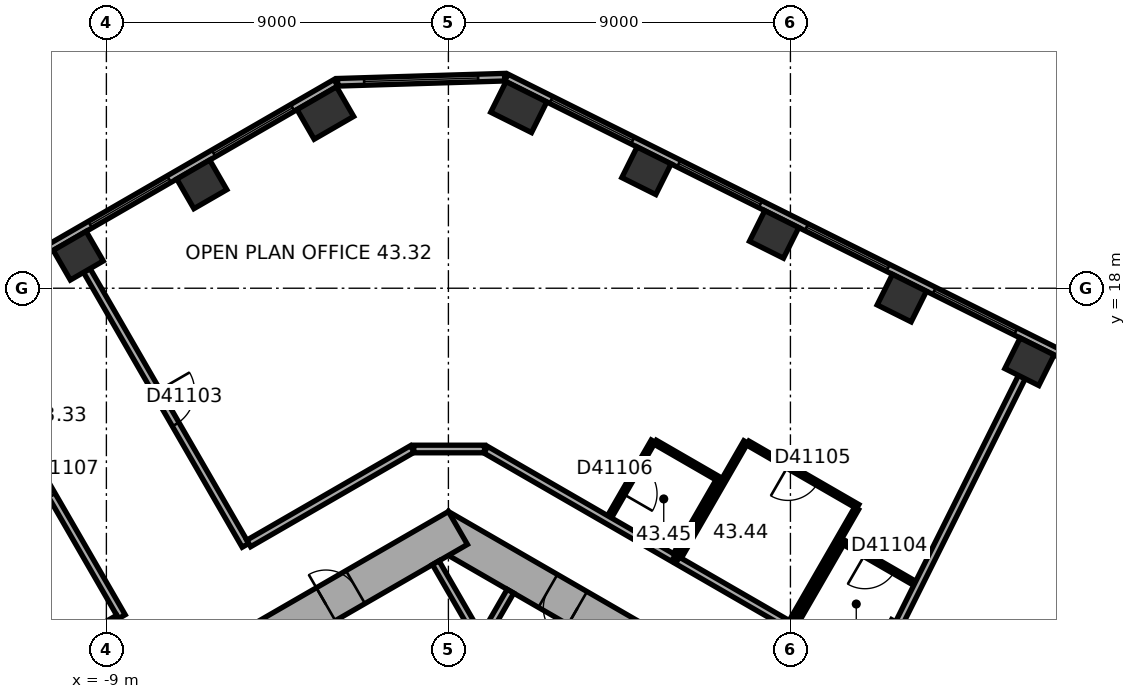
"""IFC4 building model, lengths in metres.
Left out: names, types, materials, properties, quantities, classifications, styles, units other than length and angle.
Written with IfcOpenShell. Run it as: python <this file> out.ifc"""

import sys

from ifc_helpers import new_model, si_unit, direction, frame, frame_2d, origin, origin_2d, place, context, subcontext, project, spatial, rectangle, extrude, element, fill, save


model = new_model("IFC4")
c1 = context("Model", 3, precision=1e-05, world=origin(), true_north=direction((0.0, 1.0)))
c2 = subcontext(c1, "Body", "Model", "MODEL_VIEW")
j1 = project(units=[si_unit("LENGTHUNIT", "METRE"), si_unit("PLANEANGLEUNIT", "RADIAN")], contexts=[c1])
p1 = place(None, origin())
s1 = spatial("IfcSite", under=j1, at=p1, CompositionType="ELEMENT")
p2 = place(p1, origin())
s2 = spatial("IfcBuilding", under=s1, at=p2, CompositionType="ELEMENT")
p3 = place(p2, frame((0.0, 0.0, 176.2)))
s3 = spatial("IfcBuildingStorey", under=s2, at=p3, CompositionType="ELEMENT", Elevation=176.2)
for number, where, z_axis, x_axis in (
    (1, (15.29, 16.065, 0.0), (0.0, 0.0, 1.0), (-0.895, 0.446, 0.0)),
    (2, (11.931, 17.74, 0.0), (0.0, 0.0, 1.0), (-0.895, 0.446, 0.0)),
    (3, (8.571, 19.416, 0.0), (0.0, 0.0, 1.0), (-0.895, 0.446, 0.0)),
    (4, (5.211, 21.091, 0.0), (0.0, 0.0, 1.0), (-0.895, 0.446, 0.0)),
):
    element("IfcColumn", number, at=place(p3, frame(where, z_axis=z_axis, x_axis=x_axis)), inside=s3, PredefinedType="COLUMN", context=c2, shape_type="SweptSolid", body=[
        extrude(rectangle(XDim=1.0, YDim=0.9, at=origin_2d()), origin(), (0.0, 0.0, 1.0), 3.7),
    ])
for number, where, z_axis, x_axis in (
    (5, (1.852, 22.766, 0.0), (0.0, 0.0, 1.0), (-0.895, 0.446, 0.0)),
    (6, (-3.238, 22.61, 0.0), (0.0, 0.0, 1.0), (-0.866, -0.5, 0.0)),
):
    element("IfcColumn", number, at=place(p3, frame(where, z_axis=z_axis, x_axis=x_axis)), inside=s3, PredefinedType="COLUMN", context=c2, shape_type="SweptSolid", body=[
        extrude(rectangle(XDim=1.2, YDim=0.9, at=origin_2d()), origin(), (0.0, 0.0, 1.0), 3.7),
    ])
for number, where, z_axis, x_axis in (
    (7, (-6.489, 20.733, 0.0), (0.0, 0.0, 1.0), (-0.866, -0.5, 0.0)),
    (8, (-9.74, 18.856, 0.0), (0.0, 0.0, 1.0), (-0.866, -0.5, 0.0)),
):
    element("IfcColumn", number, at=place(p3, frame(where, z_axis=z_axis, x_axis=x_axis)), inside=s3, PredefinedType="COLUMN", context=c2, shape_type="SweptSolid", body=[
        extrude(rectangle(XDim=1.0, YDim=0.9, at=origin_2d()), origin(), (0.0, 0.0, 1.0), 3.7),
    ])
p4 = place(p3, frame((10.25, 5.629, 0.0), z_axis=(0.0, 0.0, 1.0), x_axis=(-0.866022616891, 0.50000482701, 0.0)))
e9 = element("IfcWall", 9, at=p4, inside=s3, PredefinedType="SHEAR", context=c2, shape_type="SweptSolid", body=[
    extrude(rectangle(XDim=12.125, YDim=1.0, at=frame_2d((6.062, 0.0))), origin(), (0.0, 0.0, 1.0), 3.7),
])
p5 = place(p4, frame((4.012, 0.0, 0.0)))
e10 = element("IfcOpeningElement", 10, at=p5, cuts=e9, PredefinedType="OPENING", context=c2, shape_type="SweptSolid", body=[
    extrude(rectangle(XDim=0.9, YDim=2.1, at=frame_2d((0.45, 1.05))), frame((0.0, 0.51, 0.0), z_axis=(0.0, -1.0, 0.0), x_axis=(1.0, 0.0, 0.0)), (0.0, 0.0, 1.0), 1.02),
])
p6 = place(p4, frame((7.912, 0.0, 0.0)))
e11 = element("IfcOpeningElement", 11, at=p6, cuts=e9, PredefinedType="OPENING", context=c2, shape_type="SweptSolid", body=[
    extrude(rectangle(XDim=0.9, YDim=2.1, at=frame_2d((0.45, 1.05))), frame((0.0, 0.51, 0.0), z_axis=(0.0, -1.0, 0.0), x_axis=(1.0, 0.0, 0.0)), (0.0, 0.0, 1.0), 1.02),
])
p7 = place(p3, frame((0.25, 11.691, 0.0), z_axis=(0.0, 0.0, 1.0), x_axis=(-0.866022616891, -0.50000482701, 0.0)))
e12 = element("IfcWall", 12, at=p7, inside=s3, PredefinedType="SHEAR", context=c2, shape_type="SweptSolid", body=[
    extrude(rectangle(XDim=12.125, YDim=1.0, at=frame_2d((6.062, 0.0))), origin(), (0.0, 0.0, 1.0), 3.7),
])
p8 = place(p7, frame((6.262, 0.0, 0.0)))
e13 = element("IfcOpeningElement", 13, at=p8, cuts=e12, PredefinedType="OPENING", context=c2, shape_type="SweptSolid", body=[
    extrude(rectangle(XDim=1.5, YDim=2.1, at=frame_2d((0.75, 1.05))), frame((0.0, 0.51, 0.0), z_axis=(0.0, -1.0, 0.0), x_axis=(1.0, 0.0, 0.0)), (0.0, 0.0, 1.0), 1.02),
])
p9 = place(p7, frame((3.112, 0.0, 0.0)))
e14 = element("IfcOpeningElement", 14, at=p9, cuts=e12, PredefinedType="OPENING", context=c2, shape_type="SweptSolid", body=[
    extrude(rectangle(XDim=0.9, YDim=2.1, at=frame_2d((0.45, 1.05))), frame((0.0, 0.51, 0.0), z_axis=(0.0, -1.0, 0.0), x_axis=(1.0, 0.0, 0.0)), (0.0, 0.0, 1.0), 1.02),
])
p10 = place(p3, frame((19.464, 14.599, 0.0), z_axis=(0.0, 0.0, 1.0), x_axis=(-0.894935755043, 0.446195018289, 0.0)))
e15 = element("IfcWall", 15, at=p10, inside=s3, PredefinedType="STANDARD", context=c2, shape_type="SweptSolid", body=[
    extrude(rectangle(XDim=20.044, YDim=0.2, at=frame_2d((10.022, 0.0))), origin(), (0.0, 0.0, 1.0), 3.7),
])
p11 = place(p10, frame((1.313, 0.0, 0.9)))
e16 = element("IfcOpeningElement", 16, at=p11, cuts=e15, PredefinedType="OPENING", context=c2, shape_type="SweptSolid", body=[
    extrude(rectangle(XDim=2.4, YDim=2.0, at=frame_2d((1.2, 1.0))), frame((0.0, 0.11, 0.0), z_axis=(0.0, -1.0, 0.0), x_axis=(1.0, 0.0, 0.0)), (0.0, 0.0, 1.0), 0.22),
])
p12 = place(p10, frame((5.067, 0.0, 0.9)))
e17 = element("IfcOpeningElement", 17, at=p12, cuts=e15, PredefinedType="OPENING", context=c2, shape_type="SweptSolid", body=[
    extrude(rectangle(XDim=2.4, YDim=2.0, at=frame_2d((1.2, 1.0))), frame((0.0, 0.11, 0.0), z_axis=(0.0, -1.0, 0.0), x_axis=(1.0, 0.0, 0.0)), (0.0, 0.0, 1.0), 0.22),
])
p13 = place(p10, frame((8.821, 0.0, 0.9)))
e18 = element("IfcOpeningElement", 18, at=p13, cuts=e15, PredefinedType="OPENING", context=c2, shape_type="SweptSolid", body=[
    extrude(rectangle(XDim=2.4, YDim=2.0, at=frame_2d((1.2, 1.0))), frame((0.0, 0.11, 0.0), z_axis=(0.0, -1.0, 0.0), x_axis=(1.0, 0.0, 0.0)), (0.0, 0.0, 1.0), 0.22),
])
p14 = place(p10, frame((12.575, 0.0, 0.9)))
e19 = element("IfcOpeningElement", 19, at=p14, cuts=e15, PredefinedType="OPENING", context=c2, shape_type="SweptSolid", body=[
    extrude(rectangle(XDim=2.4, YDim=2.0, at=frame_2d((1.2, 1.0))), frame((0.0, 0.11, 0.0), z_axis=(0.0, -1.0, 0.0), x_axis=(1.0, 0.0, 0.0)), (0.0, 0.0, 1.0), 0.22),
])
p15 = place(p10, frame((16.329, 0.0, 0.9)))
e20 = element("IfcOpeningElement", 20, at=p15, cuts=e15, PredefinedType="OPENING", context=c2, shape_type="SweptSolid", body=[
    extrude(rectangle(XDim=2.4, YDim=2.0, at=frame_2d((1.2, 1.0))), frame((0.0, 0.11, 0.0), z_axis=(0.0, -1.0, 0.0), x_axis=(1.0, 0.0, 0.0)), (0.0, 0.0, 1.0), 0.22),
])
p16 = place(p3, frame((1.479, 23.553, 0.0), z_axis=(0.0, 0.0, 1.0), x_axis=(-0.999534786117, -0.03049936625, 0.0)))
e21 = element("IfcWall", 21, at=p16, inside=s3, PredefinedType="STANDARD", context=c2, shape_type="SweptSolid", body=[
    extrude(rectangle(XDim=4.395, YDim=0.2, at=frame_2d((2.197, 0.0))), origin(), (0.0, 0.0, 1.0), 3.7),
])
p17 = place(p16, frame((0.698, 0.0, 0.9)))
e22 = element("IfcOpeningElement", 22, at=p17, cuts=e21, PredefinedType="OPENING", context=c2, shape_type="SweptSolid", body=[
    extrude(rectangle(XDim=3.0, YDim=2.0, at=frame_2d((1.5, 1.0))), frame((0.0, 0.11, 0.0), z_axis=(0.0, -1.0, 0.0), x_axis=(1.0, 0.0, 0.0)), (0.0, 0.0, 1.0), 0.22),
])
p18 = place(p3, frame((-2.961, 23.405, 0.0), z_axis=(0.0, 0.0, 1.0), x_axis=(-0.866023315909, -0.500003616288, 0.0)))
e23 = element("IfcWall", 23, at=p18, inside=s3, PredefinedType="STANDARD", context=c2, shape_type="SweptSolid", body=[
    extrude(rectangle(XDim=20.044, YDim=0.2, at=frame_2d((10.022, 0.0))), origin(), (0.0, 0.0, 1.0), 3.7),
])
p19 = place(p18, frame((1.314, 0.0, 0.9)))
e24 = element("IfcOpeningElement", 24, at=p19, cuts=e23, PredefinedType="OPENING", context=c2, shape_type="SweptSolid", body=[
    extrude(rectangle(XDim=2.4, YDim=2.0, at=frame_2d((1.2, 1.0))), frame((0.0, 0.11, 0.0), z_axis=(0.0, -1.0, 0.0), x_axis=(1.0, 0.0, 0.0)), (0.0, 0.0, 1.0), 0.22),
])
p20 = place(p18, frame((5.069, 0.0, 0.9)))
e25 = element("IfcOpeningElement", 25, at=p20, cuts=e23, PredefinedType="OPENING", context=c2, shape_type="SweptSolid", body=[
    extrude(rectangle(XDim=2.4, YDim=2.0, at=frame_2d((1.2, 1.0))), frame((0.0, 0.11, 0.0), z_axis=(0.0, -1.0, 0.0), x_axis=(1.0, 0.0, 0.0)), (0.0, 0.0, 1.0), 0.22),
])
p21 = place(p18, frame((8.823, 0.0, 0.9)))
e26 = element("IfcOpeningElement", 26, at=p21, cuts=e23, PredefinedType="OPENING", context=c2, shape_type="SweptSolid", body=[
    extrude(rectangle(XDim=2.4, YDim=2.0, at=frame_2d((1.2, 1.0))), frame((0.0, 0.11, 0.0), z_axis=(0.0, -1.0, 0.0), x_axis=(1.0, 0.0, 0.0)), (0.0, 0.0, 1.0), 0.22),
])
p22 = place(p18, frame((12.577, 0.0, 0.9)))
e27 = element("IfcOpeningElement", 27, at=p22, cuts=e23, PredefinedType="OPENING", context=c2, shape_type="SweptSolid", body=[
    extrude(rectangle(XDim=2.4, YDim=2.0, at=frame_2d((1.2, 1.0))), frame((0.0, 0.11, 0.0), z_axis=(0.0, -1.0, 0.0), x_axis=(1.0, 0.0, 0.0)), (0.0, 0.0, 1.0), 0.22),
])
p23 = place(p18, frame((16.331, 0.0, 0.9)))
e28 = element("IfcOpeningElement", 28, at=p23, cuts=e23, PredefinedType="OPENING", context=c2, shape_type="SweptSolid", body=[
    extrude(rectangle(XDim=2.4, YDim=2.0, at=frame_2d((1.2, 1.0))), frame((0.0, 0.11, 0.0), z_axis=(0.0, -1.0, 0.0), x_axis=(1.0, 0.0, 0.0)), (0.0, 0.0, 1.0), 0.22),
])
p24 = place(p3, frame((0.532, 8.122, 0.0), z_axis=(0.0, 0.0, 1.0), x_axis=(0.500077893725, 0.86598042715, 0.0)))
e29 = element("IfcWall", 29, at=p24, inside=s3, PredefinedType="PARTITIONING", context=c2, shape_type="SweptSolid", body=[
    extrude(rectangle(XDim=2.2, YDim=0.2, at=frame_2d((1.1, 0.0))), origin(), (0.0, 0.0, 1.0), 3.42),
])
p25 = place(p3, frame((0.767, 8.872, 0.0), z_axis=(0.0, 0.0, 1.0), x_axis=(-0.499994660107, 0.866028486751, 0.0)))
e30 = element("IfcWall", 30, at=p25, inside=s3, PredefinedType="PARTITIONING", context=c2, shape_type="SweptSolid", body=[
    extrude(rectangle(XDim=2.2, YDim=0.2, at=frame_2d((1.1, 0.0))), origin(), (0.0, 0.0, 1.0), 3.42),
])
p26 = place(p3, frame((-12.766, 16.589, 0.0), z_axis=(0.0, 0.0, 1.0), x_axis=(0.500010139422, -0.866019549707, 0.0)))
e31 = element("IfcWall", 31, at=p26, inside=s3, PredefinedType="PARTITIONING", context=c2, shape_type="SweptSolid", body=[
    extrude(rectangle(XDim=8.35, YDim=0.2, at=frame_2d((4.175, 0.0))), origin(), (0.0, 0.0, 1.0), 3.42),
])
p27 = place(p26, frame((3.675, 0.0, 0.0)))
e32 = element("IfcOpeningElement", 32, at=p27, cuts=e31, PredefinedType="OPENING", context=c2, shape_type="SweptSolid", body=[
    extrude(rectangle(XDim=1.0, YDim=2.1, at=frame_2d((0.5, 1.05))), frame((0.0, 0.11, 0.0), z_axis=(0.0, -1.0, 0.0), x_axis=(1.0, 0.0, 0.0)), (0.0, 0.0, 1.0), 0.22),
])
p28 = place(p3, frame((-9.515, 18.466, 0.0), z_axis=(0.0, 0.0, 1.0), x_axis=(0.500010139422, -0.866019549707, 0.0)))
e33 = element("IfcWall", 33, at=p28, inside=s3, PredefinedType="PARTITIONING", context=c2, shape_type="SweptSolid", body=[
    extrude(rectangle(XDim=8.35, YDim=0.2, at=frame_2d((4.175, 0.0))), origin(), (0.0, 0.0, 1.0), 2.87),
])
p29 = place(p28, frame((3.675, 0.0, 0.0)))
e34 = element("IfcOpeningElement", 34, at=p29, cuts=e33, PredefinedType="OPENING", context=c2, shape_type="SweptSolid", body=[
    extrude(rectangle(XDim=1.0, YDim=2.1, at=frame_2d((0.5, 1.05))), frame((0.0, 0.11, 0.0), z_axis=(0.0, -1.0, 0.0), x_axis=(1.0, 0.0, 0.0)), (0.0, 0.0, 1.0), 0.22),
])
p30 = place(p3, frame((-8.678, 9.308, 0.0), z_axis=(0.0, 0.0, 1.0), x_axis=(-0.866000359435, -0.500043375578, 0.0)))
e35 = element("IfcWall", 35, at=p30, inside=s3, PredefinedType="PARTITIONING", context=c2, shape_type="SweptSolid", body=[
    extrude(rectangle(XDim=3.161, YDim=0.2, at=frame_2d((1.581, 0.0))), origin(), (0.0, 0.0, 1.0), 3.42),
])
p31 = place(p3, frame((-0.95, 13.77, 0.0), z_axis=(0.0, 0.0, 1.0), x_axis=(-0.866036689987, -0.499980451214, 0.0)))
e36 = element("IfcWall", 36, at=p31, inside=s3, PredefinedType="PARTITIONING", context=c2, shape_type="SweptSolid", body=[
    extrude(rectangle(XDim=4.969, YDim=0.2, at=frame_2d((2.485, 0.0))), origin(), (0.0, 0.0, 1.0), 3.42),
])
p32 = place(p3, frame((0.95, 13.77, 0.0), z_axis=(0.0, 0.0, 1.0), x_axis=(-1.0, 0.0, 0.0)))
e37 = element("IfcWall", 37, at=p32, inside=s3, PredefinedType="PARTITIONING", context=c2, shape_type="SweptSolid", body=[
    extrude(rectangle(XDim=1.86, YDim=0.2, at=frame_2d((0.93, 0.0))), origin(), (0.0, 0.0, 1.0), 3.42),
])
p33 = place(p3, frame((4.24, 11.986, 0.0), z_axis=(0.0, 0.0, 1.0), x_axis=(0.499952165731, 0.866053019151, 0.0)))
e38 = element("IfcWall", 38, at=p33, inside=s3, PredefinedType="PARTITIONING", context=c2, shape_type="SweptSolid", body=[
    extrude(rectangle(XDim=2.3, YDim=0.12, at=frame_2d((1.15, 0.0))), origin(), (0.0, 0.0, 1.0), 3.42),
])
p34 = place(p33, frame((0.7, 0.0, 0.0)))
e39 = element("IfcOpeningElement", 39, at=p34, cuts=e38, PredefinedType="OPENING", context=c2, shape_type="SweptSolid", body=[
    extrude(rectangle(XDim=0.9, YDim=2.1, at=frame_2d((0.45, 1.05))), frame((0.0, 0.07, 0.0), z_axis=(0.0, -1.0, 0.0), x_axis=(1.0, 0.0, 0.0)), (0.0, 0.0, 1.0), 0.14),
])
p35 = place(p3, frame((5.442, 13.948, 0.0), z_axis=(0.0, 0.0, 1.0), x_axis=(0.866043088465, -0.499969367985, 0.0)))
e40 = element("IfcWall", 40, at=p35, inside=s3, PredefinedType="PARTITIONING", context=c2, shape_type="SweptSolid", body=[
    extrude(rectangle(XDim=1.94, YDim=0.12, at=frame_2d((0.97, 0.0))), origin(), (0.0, 0.0, 1.0), 3.42),
])
p36 = place(p3, frame((5.922, 10.899, 0.0), z_axis=(0.0, 0.0, 1.0), x_axis=(-0.866031556924, 0.499989342298, 0.0)))
e41 = element("IfcWall", 41, at=p36, inside=s3, PredefinedType="PARTITIONING", context=c2, shape_type="SweptSolid", body=[
    extrude(rectangle(XDim=5.701, YDim=0.2, at=frame_2d((2.851, 0.0))), origin(), (0.0, 0.0, 1.0), 3.42),
])
p37 = place(p3, frame((6.076, 10.926, 0.0), z_axis=(0.0, 0.0, 1.0), x_axis=(0.500010275428, 0.866019471182, 0.0)))
e42 = element("IfcWall", 42, at=p37, inside=s3, PredefinedType="PARTITIONING", context=c2, shape_type="SweptSolid", body=[
    extrude(rectangle(XDim=3.5, YDim=0.12, at=frame_2d((1.75, 0.0))), origin(), (0.0, 0.0, 1.0), 3.42),
])
p38 = place(p3, frame((7.092, 12.926, 0.0), z_axis=(0.0, 0.0, 1.0), x_axis=(-0.500030632641, -0.866007717299, 0.0)))
e43 = element("IfcWall", 43, at=p38, inside=s3, PredefinedType="PARTITIONING", context=c2, shape_type="SweptSolid", body=[
    extrude(rectangle(XDim=2.24, YDim=0.12, at=frame_2d((1.12, 0.0))), origin(), (0.0, 0.0, 1.0), 3.42),
])
p39 = place(p3, frame((7.878, 13.927, 0.0), z_axis=(0.0, 0.0, 1.0), x_axis=(0.866021245731, -0.500007201891, 0.0)))
e44 = element("IfcWall", 44, at=p39, inside=s3, PredefinedType="PARTITIONING", context=c2, shape_type="SweptSolid", body=[
    extrude(rectangle(XDim=3.34, YDim=0.12, at=frame_2d((1.67, 0.0))), origin(), (0.0, 0.0, 1.0), 3.42),
])
p40 = place(p39, frame((1.22, 0.0, 0.0)))
e45 = element("IfcOpeningElement", 45, at=p40, cuts=e44, PredefinedType="OPENING", context=c2, shape_type="SweptSolid", body=[
    extrude(rectangle(XDim=0.9, YDim=2.1, at=frame_2d((0.45, 1.05))), frame((0.0, 0.07, 0.0), z_axis=(0.0, -1.0, 0.0), x_axis=(1.0, 0.0, 0.0)), (0.0, 0.0, 1.0), 0.14),
])
p41 = place(p3, frame((8.971, 9.139, 0.0), z_axis=(0.0, 0.0, 1.0), x_axis=(-0.866038511948, 0.499977295307, 0.0)))
e46 = element("IfcWall", 46, at=p41, inside=s3, PredefinedType="PARTITIONING", context=c2, shape_type="SweptSolid", body=[
    extrude(rectangle(XDim=3.4, YDim=0.2, at=frame_2d((1.7, 0.0))), origin(), (0.0, 0.0, 1.0), 3.42),
])
p42 = place(p3, frame((9.125, 9.166, 0.0), z_axis=(0.0, 0.0, 1.0), x_axis=(0.500004234368, 0.866022959057, 0.0)))
e47 = element("IfcWall", 47, at=p42, inside=s3, PredefinedType="PARTITIONING", context=c2, shape_type="SweptSolid", body=[
    extrude(rectangle(XDim=2.5, YDim=0.12, at=frame_2d((1.25, 0.0))), origin(), (0.0, 0.0, 1.0), 3.42),
])
p43 = place(p3, frame((10.427, 11.301, 0.0), z_axis=(0.0, 0.0, 1.0), x_axis=(0.866019511163, -0.500010206181, 0.0)))
e48 = element("IfcWall", 48, at=p43, inside=s3, PredefinedType="PARTITIONING", context=c2, shape_type="SweptSolid", body=[
    extrude(rectangle(XDim=2.13, YDim=0.12, at=frame_2d((1.065, 0.0))), origin(), (0.0, 0.0, 1.0), 3.42),
])
p44 = place(p43, frame((0.615, 0.0, 0.0)))
e49 = element("IfcOpeningElement", 49, at=p44, cuts=e48, PredefinedType="OPENING", context=c2, shape_type="SweptSolid", body=[
    extrude(rectangle(XDim=0.9, YDim=2.1, at=frame_2d((0.45, 1.05))), frame((0.0, 0.07, 0.0), z_axis=(0.0, -1.0, 0.0), x_axis=(1.0, 0.0, 0.0)), (0.0, 0.0, 1.0), 0.14),
])
p45 = place(p3, frame((10.74, 12.205, 0.0), z_axis=(0.0, 0.0, 1.0), x_axis=(-0.499978425106, -0.866037859697, 0.0)))
e50 = element("IfcWall", 50, at=p45, inside=s3, PredefinedType="PARTITIONING", context=c2, shape_type="SweptSolid", body=[
    extrude(rectangle(XDim=3.44, YDim=0.12, at=frame_2d((1.72, 0.0))), origin(), (0.0, 0.0, 1.0), 3.42),
])
p46 = place(p3, frame((15.09, 15.663, 0.0), z_axis=(0.0, 0.0, 1.0), x_axis=(-0.446206011687, -0.894930273895, 0.0)))
e51 = element("IfcWall", 51, at=p46, inside=s3, PredefinedType="PARTITIONING", context=c2, shape_type="SweptSolid", body=[
    extrude(rectangle(XDim=8.725, YDim=0.2, at=frame_2d((4.363, 0.0))), origin(), (0.0, 0.0, 1.0), 3.42),
])
p47 = place(p12, origin())
e52 = element("IfcWindow", 52, at=p47, inside=s3, PartitioningType="SINGLE_PANEL", PredefinedType="WINDOW", context=c2, shape_type="SweptSolid", body=[
    extrude(rectangle(XDim=2.4, YDim=2.0, at=frame_2d((1.2, 1.0))), frame((0.0, 0.03, 0.0), z_axis=(0.0, -1.0, 0.0), x_axis=(1.0, 0.0, 0.0)), (0.0, 0.0, 1.0), 0.06),
])
fill(e17, e52)
p48 = place(p13, origin())
e53 = element("IfcWindow", 53, at=p48, inside=s3, PartitioningType="SINGLE_PANEL", PredefinedType="WINDOW", context=c2, shape_type="SweptSolid", body=[
    extrude(rectangle(XDim=2.4, YDim=2.0, at=frame_2d((1.2, 1.0))), frame((0.0, 0.03, 0.0), z_axis=(0.0, -1.0, 0.0), x_axis=(1.0, 0.0, 0.0)), (0.0, 0.0, 1.0), 0.06),
])
fill(e18, e53)
p49 = place(p14, origin())
e54 = element("IfcWindow", 54, at=p49, inside=s3, PartitioningType="SINGLE_PANEL", PredefinedType="WINDOW", context=c2, shape_type="SweptSolid", body=[
    extrude(rectangle(XDim=2.4, YDim=2.0, at=frame_2d((1.2, 1.0))), frame((0.0, 0.03, 0.0), z_axis=(0.0, -1.0, 0.0), x_axis=(1.0, 0.0, 0.0)), (0.0, 0.0, 1.0), 0.06),
])
fill(e19, e54)
p50 = place(p15, origin())
e55 = element("IfcWindow", 55, at=p50, inside=s3, PartitioningType="SINGLE_PANEL", PredefinedType="WINDOW", context=c2, shape_type="SweptSolid", body=[
    extrude(rectangle(XDim=2.4, YDim=2.0, at=frame_2d((1.2, 1.0))), frame((0.0, 0.03, 0.0), z_axis=(0.0, -1.0, 0.0), x_axis=(1.0, 0.0, 0.0)), (0.0, 0.0, 1.0), 0.06),
])
fill(e20, e55)
p51 = place(p17, origin())
e56 = element("IfcWindow", 56, at=p51, inside=s3, PartitioningType="SINGLE_PANEL", PredefinedType="WINDOW", context=c2, shape_type="SweptSolid", body=[
    extrude(rectangle(XDim=3.0, YDim=2.0, at=frame_2d((1.5, 1.0))), frame((0.0, 0.03, 0.0), z_axis=(0.0, -1.0, 0.0), x_axis=(1.0, 0.0, 0.0)), (0.0, 0.0, 1.0), 0.06),
])
fill(e22, e56)
p52 = place(p19, origin())
e57 = element("IfcWindow", 57, at=p52, inside=s3, PartitioningType="SINGLE_PANEL", PredefinedType="WINDOW", context=c2, shape_type="SweptSolid", body=[
    extrude(rectangle(XDim=2.4, YDim=2.0, at=frame_2d((1.2, 1.0))), frame((0.0, 0.03, 0.0), z_axis=(0.0, -1.0, 0.0), x_axis=(1.0, 0.0, 0.0)), (0.0, 0.0, 1.0), 0.06),
])
fill(e24, e57)
p53 = place(p20, origin())
e58 = element("IfcWindow", 58, at=p53, inside=s3, PartitioningType="SINGLE_PANEL", PredefinedType="WINDOW", context=c2, shape_type="SweptSolid", body=[
    extrude(rectangle(XDim=2.4, YDim=2.0, at=frame_2d((1.2, 1.0))), frame((0.0, 0.03, 0.0), z_axis=(0.0, -1.0, 0.0), x_axis=(1.0, 0.0, 0.0)), (0.0, 0.0, 1.0), 0.06),
])
fill(e25, e58)
p54 = place(p6, origin())
e59 = element("IfcDoor", 59, at=p54, inside=s3, OperationType="SINGLE_SWING_LEFT", PredefinedType="DOOR", context=c2, shape_type="SweptSolid", body=[
    extrude(rectangle(XDim=0.9, YDim=2.1, at=frame_2d((0.45, 1.05))), frame((0.0, 0.025, 0.0), z_axis=(0.0, -1.0, 0.0), x_axis=(1.0, 0.0, 0.0)), (0.0, 0.0, 1.0), 0.05),
])
fill(e11, e59)
p55 = place(p9, origin())
e60 = element("IfcDoor", 60, at=p55, inside=s3, OperationType="SINGLE_SWING_LEFT", PredefinedType="DOOR", context=c2, shape_type="SweptSolid", body=[
    extrude(rectangle(XDim=0.9, YDim=2.1, at=frame_2d((0.45, 1.05))), frame((0.0, 0.025, 0.0), z_axis=(0.0, -1.0, 0.0), x_axis=(1.0, 0.0, 0.0)), (0.0, 0.0, 1.0), 0.05),
])
fill(e14, e60)
p56 = place(p29, origin())
e61 = element("IfcDoor", 61, at=p56, inside=s3, OperationType="SINGLE_SWING_LEFT", PredefinedType="DOOR", context=c2, shape_type="SweptSolid", body=[
    extrude(rectangle(XDim=1.0, YDim=2.1, at=frame_2d((0.5, 1.05))), frame((0.0, 0.025, 0.0), z_axis=(0.0, -1.0, 0.0), x_axis=(1.0, 0.0, 0.0)), (0.0, 0.0, 1.0), 0.05),
])
fill(e34, e61)
p57 = place(p44, origin())
e62 = element("IfcDoor", 62, at=p57, inside=s3, OperationType="SINGLE_SWING_LEFT", PredefinedType="DOOR", context=c2, shape_type="SweptSolid", body=[
    extrude(rectangle(XDim=0.9, YDim=2.1, at=frame_2d((0.45, 1.05))), frame((0.0, 0.025, 0.0), z_axis=(0.0, -1.0, 0.0), x_axis=(1.0, 0.0, 0.0)), (0.0, 0.0, 1.0), 0.05),
])
fill(e49, e62)
p58 = place(p40, origin())
e63 = element("IfcDoor", 63, at=p58, inside=s3, OperationType="SINGLE_SWING_LEFT", PredefinedType="DOOR", context=c2, shape_type="SweptSolid", body=[
    extrude(rectangle(XDim=0.9, YDim=2.1, at=frame_2d((0.45, 1.05))), frame((0.0, 0.025, 0.0), z_axis=(0.0, -1.0, 0.0), x_axis=(1.0, 0.0, 0.0)), (0.0, 0.0, 1.0), 0.05),
])
fill(e45, e63)
p59 = place(p34, origin())
e64 = element("IfcDoor", 64, at=p59, inside=s3, OperationType="SINGLE_SWING_LEFT", PredefinedType="DOOR", context=c2, shape_type="SweptSolid", body=[
    extrude(rectangle(XDim=0.9, YDim=2.1, at=frame_2d((0.45, 1.05))), frame((0.0, 0.025, 0.0), z_axis=(0.0, -1.0, 0.0), x_axis=(1.0, 0.0, 0.0)), (0.0, 0.0, 1.0), 0.05),
])
fill(e39, e64)
p60 = place(p27, origin())
e65 = element("IfcDoor", 65, at=p60, inside=s3, OperationType="SINGLE_SWING_LEFT", PredefinedType="DOOR", context=c2, shape_type="SweptSolid", body=[
    extrude(rectangle(XDim=1.0, YDim=2.1, at=frame_2d((0.5, 1.05))), frame((0.0, 0.025, 0.0), z_axis=(0.0, -1.0, 0.0), x_axis=(1.0, 0.0, 0.0)), (0.0, 0.0, 1.0), 0.05),
])
fill(e32, e65)
save(model, sys.argv[1])
